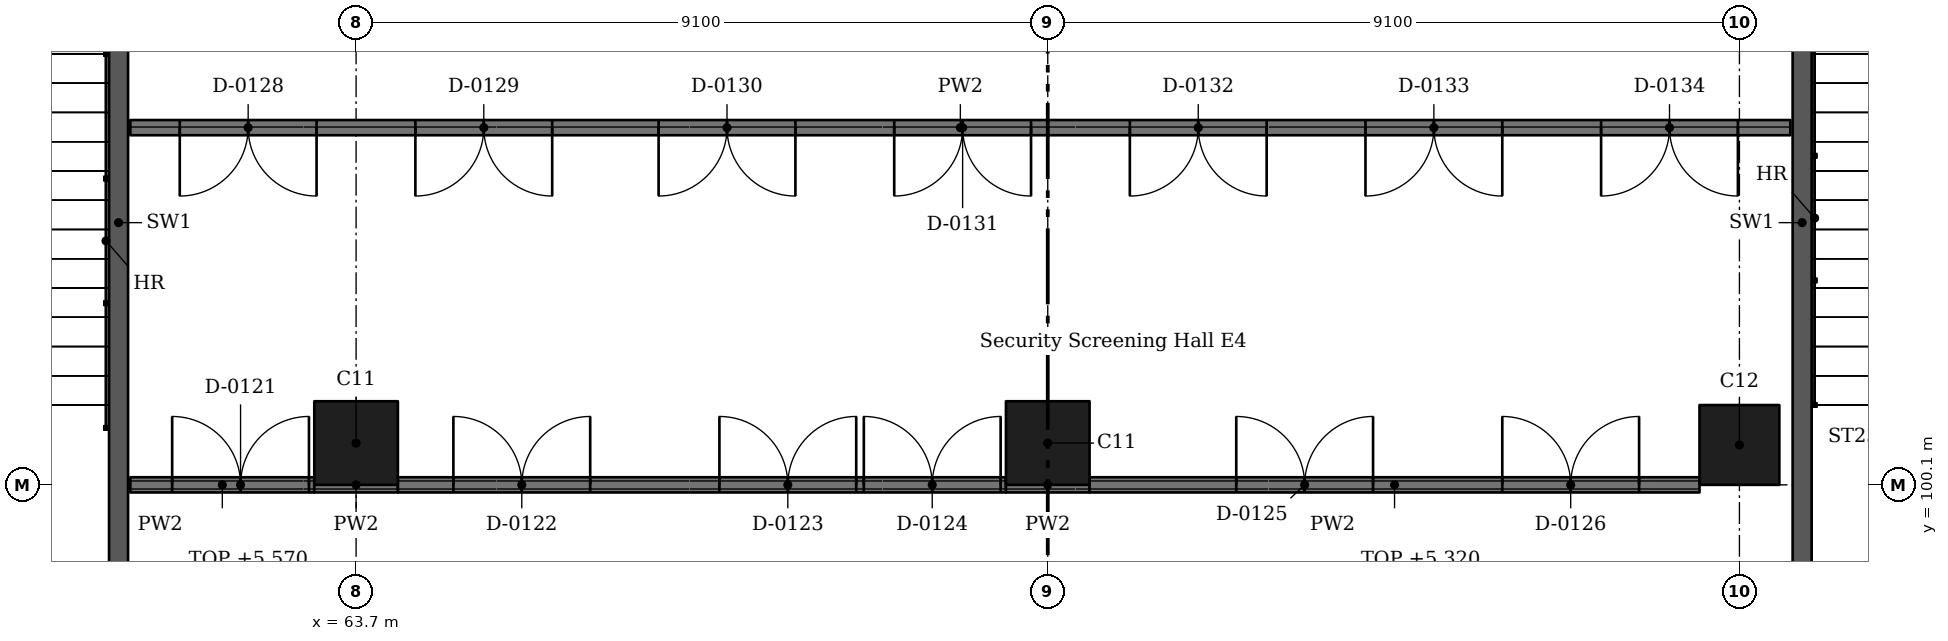
"""IFC4 building model, lengths in metres.
Left out: names, types, materials, properties, quantities, classifications, styles, units other than length and angle.
Written with IfcOpenShell. Run it as: python <this file> out.ifc"""

import sys

from ifc_helpers import new_model, si_unit, direction, frame, frame_2d, origin, origin_2d, place, context, subcontext, project, spatial, rectangle, extrude, element, fill, save


model = new_model("IFC4")
c1 = context("Model", 3, precision=1e-05, world=origin(), true_north=direction((0.0, 1.0)))
c2 = subcontext(c1, "Body", "Model", "MODEL_VIEW")
j1 = project(units=[si_unit("LENGTHUNIT", "METRE"), si_unit("PLANEANGLEUNIT", "RADIAN")], contexts=[c1])
p1 = place(None, origin())
s1 = spatial("IfcSite", under=j1, at=p1, CompositionType="ELEMENT")
p2 = place(p1, origin())
s2 = spatial("IfcBuilding", under=s1, at=p2, CompositionType="ELEMENT")
p3 = place(p2, origin())
s3 = spatial("IfcBuildingStorey", under=s2, at=p3, CompositionType="ELEMENT", Elevation=0.0)
for number, where, z_axis, x_axis in (
    (1, (63.7, 100.65, -0.4), (0.0, 0.0, 1.0), (1.0, 0.0, 0.0)),
    (2, (72.8, 100.65, -0.4), (0.0, 0.0, 1.0), (1.0, 0.0, 0.0)),
):
    element("IfcColumn", number, at=place(p3, frame(where, z_axis=z_axis, x_axis=x_axis)), inside=s3, PredefinedType="COLUMN", context=c2, shape_type="SweptSolid", body=[
        extrude(rectangle(XDim=1.1, YDim=1.1, at=origin_2d()), origin(), (0.0, 0.0, 1.0), 6.77),
    ])
p4 = place(p3, frame((81.9, 100.625, -0.4), z_axis=(0.0, 0.0, 1.0), x_axis=(1.0, 0.0, 0.0)))
e3 = element("IfcColumn", 3, at=p4, inside=s3, PredefinedType="COLUMN", context=c2, shape_type="SweptSolid", body=[
    extrude(rectangle(XDim=1.05, YDim=1.05, at=origin_2d()), origin(), (0.0, 0.0, 1.0), 6.77),
])
for number, where, z_axis, x_axis in (
    (4, (60.575, 108.35, -0.4), (0.0, 0.0, 1.0), (0.0, -1.0, 0.0)),
    (5, (82.725, 108.35, -0.4), (0.0, 0.0, 1.0), (0.0, -1.0, 0.0)),
):
    element("IfcWall", number, at=place(p3, frame(where, z_axis=z_axis, x_axis=x_axis)), inside=s3, PredefinedType="SHEAR", context=c2, shape_type="SweptSolid", body=[
        extrude(rectangle(XDim=9.6, YDim=0.25, at=frame_2d((4.8, 0.0))), origin(), (0.0, 0.0, 1.0), 6.77),
    ])
p5 = place(p3, frame((60.73, 100.1, 0.0), z_axis=(0.0, 0.0, 1.0), x_axis=(1.0, 0.0, 0.0)))
e6 = element("IfcWall", 6, at=p5, inside=s3, PredefinedType="PARTITIONING", context=c2, shape_type="SweptSolid", body=[
    extrude(rectangle(XDim=2.42, YDim=0.2, at=frame_2d((1.21, 0.0))), origin(), (0.0, 0.0, 1.0), 5.57),
])
p6 = place(p5, frame((0.55, 0.0, 0.0)))
e7 = element("IfcOpeningElement", 7, at=p6, cuts=e6, PredefinedType="OPENING", context=c2, shape_type="SweptSolid", body=[
    extrude(rectangle(XDim=1.8, YDim=2.4, at=frame_2d((0.9, 1.2))), frame((0.0, 0.11, 0.0), z_axis=(0.0, -1.0, 0.0), x_axis=(1.0, 0.0, 0.0)), (0.0, 0.0, 1.0), 0.22),
])
p7 = place(p3, frame((60.73, 104.8, 0.0), z_axis=(0.0, 0.0, 1.0), x_axis=(1.0, 0.0, 0.0)))
e8 = element("IfcWall", 8, at=p7, inside=s3, PredefinedType="PARTITIONING", context=c2, shape_type="SweptSolid", body=[
    extrude(rectangle(XDim=21.84, YDim=0.2, at=frame_2d((10.92, 0.0))), origin(), (0.0, 0.0, 1.0), 6.02),
])
p8 = place(p7, frame((0.65, 0.0, 0.0)))
e9 = element("IfcOpeningElement", 9, at=p8, cuts=e8, PredefinedType="OPENING", context=c2, shape_type="SweptSolid", body=[
    extrude(rectangle(XDim=1.8, YDim=2.4, at=frame_2d((0.9, 1.2))), frame((0.0, 0.11, 0.0), z_axis=(0.0, -1.0, 0.0), x_axis=(1.0, 0.0, 0.0)), (0.0, 0.0, 1.0), 0.22),
])
p9 = place(p7, frame((3.75, 0.0, 0.0)))
e10 = element("IfcOpeningElement", 10, at=p9, cuts=e8, PredefinedType="OPENING", context=c2, shape_type="SweptSolid", body=[
    extrude(rectangle(XDim=1.8, YDim=2.4, at=frame_2d((0.9, 1.2))), frame((0.0, 0.11, 0.0), z_axis=(0.0, -1.0, 0.0), x_axis=(1.0, 0.0, 0.0)), (0.0, 0.0, 1.0), 0.22),
])
p10 = place(p7, frame((6.95, 0.0, 0.0)))
e11 = element("IfcOpeningElement", 11, at=p10, cuts=e8, PredefinedType="OPENING", context=c2, shape_type="SweptSolid", body=[
    extrude(rectangle(XDim=1.8, YDim=2.4, at=frame_2d((0.9, 1.2))), frame((0.0, 0.11, 0.0), z_axis=(0.0, -1.0, 0.0), x_axis=(1.0, 0.0, 0.0)), (0.0, 0.0, 1.0), 0.22),
])
p11 = place(p7, frame((10.05, 0.0, 0.0)))
e12 = element("IfcOpeningElement", 12, at=p11, cuts=e8, PredefinedType="OPENING", context=c2, shape_type="SweptSolid", body=[
    extrude(rectangle(XDim=1.8, YDim=2.4, at=frame_2d((0.9, 1.2))), frame((0.0, 0.11, 0.0), z_axis=(0.0, -1.0, 0.0), x_axis=(1.0, 0.0, 0.0)), (0.0, 0.0, 1.0), 0.22),
])
p12 = place(p7, frame((13.15, 0.0, 0.0)))
e13 = element("IfcOpeningElement", 13, at=p12, cuts=e8, PredefinedType="OPENING", context=c2, shape_type="SweptSolid", body=[
    extrude(rectangle(XDim=1.8, YDim=2.4, at=frame_2d((0.9, 1.2))), frame((0.0, 0.11, 0.0), z_axis=(0.0, -1.0, 0.0), x_axis=(1.0, 0.0, 0.0)), (0.0, 0.0, 1.0), 0.22),
])
p13 = place(p7, frame((16.25, 0.0, 0.0)))
e14 = element("IfcOpeningElement", 14, at=p13, cuts=e8, PredefinedType="OPENING", context=c2, shape_type="SweptSolid", body=[
    extrude(rectangle(XDim=1.8, YDim=2.4, at=frame_2d((0.9, 1.2))), frame((0.0, 0.11, 0.0), z_axis=(0.0, -1.0, 0.0), x_axis=(1.0, 0.0, 0.0)), (0.0, 0.0, 1.0), 0.22),
])
p14 = place(p7, frame((19.35, 0.0, 0.0)))
e15 = element("IfcOpeningElement", 15, at=p14, cuts=e8, PredefinedType="OPENING", context=c2, shape_type="SweptSolid", body=[
    extrude(rectangle(XDim=1.8, YDim=2.4, at=frame_2d((0.9, 1.2))), frame((0.0, 0.11, 0.0), z_axis=(0.0, -1.0, 0.0), x_axis=(1.0, 0.0, 0.0)), (0.0, 0.0, 1.0), 0.22),
])
p15 = place(p3, frame((63.15, 100.1, 0.0), z_axis=(0.0, 0.0, 1.0), x_axis=(1.0, 0.0, 0.0)))
e16 = element("IfcWall", 16, at=p15, inside=s3, PredefinedType="PARTITIONING", context=c2, shape_type="SweptSolid", body=[
    extrude(rectangle(XDim=1.1, YDim=0.2, at=frame_2d((0.55, 0.0))), origin(), (0.0, 0.0, 1.0), 6.02),
])
p16 = place(p3, frame((64.25, 100.1, 0.0), z_axis=(0.0, 0.0, 1.0), x_axis=(1.0, 0.0, 0.0)))
e17 = element("IfcWall", 17, at=p16, inside=s3, PredefinedType="PARTITIONING", context=c2, shape_type="SweptSolid", body=[
    extrude(rectangle(XDim=8.0, YDim=0.2, at=frame_2d((4.0, 0.0))), origin(), (0.0, 0.0, 1.0), 5.32),
])
p17 = place(p16, frame((0.73, 0.0, 0.0)))
e18 = element("IfcOpeningElement", 18, at=p17, cuts=e17, PredefinedType="OPENING", context=c2, shape_type="SweptSolid", body=[
    extrude(rectangle(XDim=1.8, YDim=2.4, at=frame_2d((0.9, 1.2))), frame((0.0, 0.11, 0.0), z_axis=(0.0, -1.0, 0.0), x_axis=(1.0, 0.0, 0.0)), (0.0, 0.0, 1.0), 0.22),
])
p18 = place(p16, frame((4.23, 0.0, 0.0)))
e19 = element("IfcOpeningElement", 19, at=p18, cuts=e17, PredefinedType="OPENING", context=c2, shape_type="SweptSolid", body=[
    extrude(rectangle(XDim=1.8, YDim=2.4, at=frame_2d((0.9, 1.2))), frame((0.0, 0.11, 0.0), z_axis=(0.0, -1.0, 0.0), x_axis=(1.0, 0.0, 0.0)), (0.0, 0.0, 1.0), 0.22),
])
p19 = place(p16, frame((6.13, 0.0, 0.0)))
e20 = element("IfcOpeningElement", 20, at=p19, cuts=e17, PredefinedType="OPENING", context=c2, shape_type="SweptSolid", body=[
    extrude(rectangle(XDim=1.8, YDim=2.4, at=frame_2d((0.9, 1.2))), frame((0.0, 0.11, 0.0), z_axis=(0.0, -1.0, 0.0), x_axis=(1.0, 0.0, 0.0)), (0.0, 0.0, 1.0), 0.22),
])
p20 = place(p3, frame((72.25, 100.1, 0.0), z_axis=(0.0, 0.0, 1.0), x_axis=(1.0, 0.0, 0.0)))
e21 = element("IfcWall", 21, at=p20, inside=s3, PredefinedType="PARTITIONING", context=c2, shape_type="SweptSolid", body=[
    extrude(rectangle(XDim=1.1, YDim=0.2, at=frame_2d((0.55, 0.0))), origin(), (0.0, 0.0, 1.0), 6.02),
])
p21 = place(p3, frame((73.35, 100.1, 0.0), z_axis=(0.0, 0.0, 1.0), x_axis=(1.0, 0.0, 0.0)))
e22 = element("IfcWall", 22, at=p21, inside=s3, PredefinedType="PARTITIONING", context=c2, shape_type="SweptSolid", body=[
    extrude(rectangle(XDim=8.025, YDim=0.2, at=frame_2d((4.012, 0.0))), origin(), (0.0, 0.0, 1.0), 5.32),
])
p22 = place(p21, frame((1.93, 0.0, 0.0)))
e23 = element("IfcOpeningElement", 23, at=p22, cuts=e22, PredefinedType="OPENING", context=c2, shape_type="SweptSolid", body=[
    extrude(rectangle(XDim=1.8, YDim=2.4, at=frame_2d((0.9, 1.2))), frame((0.0, 0.11, 0.0), z_axis=(0.0, -1.0, 0.0), x_axis=(1.0, 0.0, 0.0)), (0.0, 0.0, 1.0), 0.22),
])
p23 = place(p21, frame((5.43, 0.0, 0.0)))
e24 = element("IfcOpeningElement", 24, at=p23, cuts=e22, PredefinedType="OPENING", context=c2, shape_type="SweptSolid", body=[
    extrude(rectangle(XDim=1.8, YDim=2.4, at=frame_2d((0.9, 1.2))), frame((0.0, 0.11, 0.0), z_axis=(0.0, -1.0, 0.0), x_axis=(1.0, 0.0, 0.0)), (0.0, 0.0, 1.0), 0.22),
])
p24 = place(p6, origin())
e25 = element("IfcDoor", 25, at=p24, inside=s3, OperationType="DOUBLE_DOOR_SINGLE_SWING", PredefinedType="DOOR", context=c2, shape_type="SweptSolid", body=[
    extrude(rectangle(XDim=1.8, YDim=2.4, at=frame_2d((0.9, 1.2))), frame((0.0, 0.025, 0.0), z_axis=(0.0, -1.0, 0.0), x_axis=(1.0, 0.0, 0.0)), (0.0, 0.0, 1.0), 0.05),
])
fill(e7, e25)
p25 = place(p17, origin())
e26 = element("IfcDoor", 26, at=p25, inside=s3, OperationType="DOUBLE_DOOR_SINGLE_SWING", PredefinedType="DOOR", context=c2, shape_type="SweptSolid", body=[
    extrude(rectangle(XDim=1.8, YDim=2.4, at=frame_2d((0.9, 1.2))), frame((0.0, 0.025, 0.0), z_axis=(0.0, -1.0, 0.0), x_axis=(1.0, 0.0, 0.0)), (0.0, 0.0, 1.0), 0.05),
])
fill(e18, e26)
p26 = place(p18, origin())
e27 = element("IfcDoor", 27, at=p26, inside=s3, OperationType="DOUBLE_DOOR_SINGLE_SWING", PredefinedType="DOOR", context=c2, shape_type="SweptSolid", body=[
    extrude(rectangle(XDim=1.8, YDim=2.4, at=frame_2d((0.9, 1.2))), frame((0.0, 0.025, 0.0), z_axis=(0.0, -1.0, 0.0), x_axis=(1.0, 0.0, 0.0)), (0.0, 0.0, 1.0), 0.05),
])
fill(e19, e27)
p27 = place(p19, origin())
e28 = element("IfcDoor", 28, at=p27, inside=s3, OperationType="DOUBLE_DOOR_SINGLE_SWING", PredefinedType="DOOR", context=c2, shape_type="SweptSolid", body=[
    extrude(rectangle(XDim=1.8, YDim=2.4, at=frame_2d((0.9, 1.2))), frame((0.0, 0.025, 0.0), z_axis=(0.0, -1.0, 0.0), x_axis=(1.0, 0.0, 0.0)), (0.0, 0.0, 1.0), 0.05),
])
fill(e20, e28)
p28 = place(p22, origin())
e29 = element("IfcDoor", 29, at=p28, inside=s3, OperationType="DOUBLE_DOOR_SINGLE_SWING", PredefinedType="DOOR", context=c2, shape_type="SweptSolid", body=[
    extrude(rectangle(XDim=1.8, YDim=2.4, at=frame_2d((0.9, 1.2))), frame((0.0, 0.025, 0.0), z_axis=(0.0, -1.0, 0.0), x_axis=(1.0, 0.0, 0.0)), (0.0, 0.0, 1.0), 0.05),
])
fill(e23, e29)
p29 = place(p23, origin())
e30 = element("IfcDoor", 30, at=p29, inside=s3, OperationType="DOUBLE_DOOR_SINGLE_SWING", PredefinedType="DOOR", context=c2, shape_type="SweptSolid", body=[
    extrude(rectangle(XDim=1.8, YDim=2.4, at=frame_2d((0.9, 1.2))), frame((0.0, 0.025, 0.0), z_axis=(0.0, -1.0, 0.0), x_axis=(1.0, 0.0, 0.0)), (0.0, 0.0, 1.0), 0.05),
])
fill(e24, e30)
p30 = place(p8, origin())
e31 = element("IfcDoor", 31, at=p30, inside=s3, OperationType="DOUBLE_DOOR_SINGLE_SWING", PredefinedType="DOOR", context=c2, shape_type="SweptSolid", body=[
    extrude(rectangle(XDim=1.8, YDim=2.4, at=frame_2d((0.9, 1.2))), frame((0.0, 0.025, 0.0), z_axis=(0.0, -1.0, 0.0), x_axis=(1.0, 0.0, 0.0)), (0.0, 0.0, 1.0), 0.05),
])
fill(e9, e31)
p31 = place(p9, origin())
e32 = element("IfcDoor", 32, at=p31, inside=s3, OperationType="DOUBLE_DOOR_SINGLE_SWING", PredefinedType="DOOR", context=c2, shape_type="SweptSolid", body=[
    extrude(rectangle(XDim=1.8, YDim=2.4, at=frame_2d((0.9, 1.2))), frame((0.0, 0.025, 0.0), z_axis=(0.0, -1.0, 0.0), x_axis=(1.0, 0.0, 0.0)), (0.0, 0.0, 1.0), 0.05),
])
fill(e10, e32)
p32 = place(p10, origin())
e33 = element("IfcDoor", 33, at=p32, inside=s3, OperationType="DOUBLE_DOOR_SINGLE_SWING", PredefinedType="DOOR", context=c2, shape_type="SweptSolid", body=[
    extrude(rectangle(XDim=1.8, YDim=2.4, at=frame_2d((0.9, 1.2))), frame((0.0, 0.025, 0.0), z_axis=(0.0, -1.0, 0.0), x_axis=(1.0, 0.0, 0.0)), (0.0, 0.0, 1.0), 0.05),
])
fill(e11, e33)
p33 = place(p11, origin())
e34 = element("IfcDoor", 34, at=p33, inside=s3, OperationType="DOUBLE_DOOR_SINGLE_SWING", PredefinedType="DOOR", context=c2, shape_type="SweptSolid", body=[
    extrude(rectangle(XDim=1.8, YDim=2.4, at=frame_2d((0.9, 1.2))), frame((0.0, 0.025, 0.0), z_axis=(0.0, -1.0, 0.0), x_axis=(1.0, 0.0, 0.0)), (0.0, 0.0, 1.0), 0.05),
])
fill(e12, e34)
p34 = place(p12, origin())
e35 = element("IfcDoor", 35, at=p34, inside=s3, OperationType="DOUBLE_DOOR_SINGLE_SWING", PredefinedType="DOOR", context=c2, shape_type="SweptSolid", body=[
    extrude(rectangle(XDim=1.8, YDim=2.4, at=frame_2d((0.9, 1.2))), frame((0.0, 0.025, 0.0), z_axis=(0.0, -1.0, 0.0), x_axis=(1.0, 0.0, 0.0)), (0.0, 0.0, 1.0), 0.05),
])
fill(e13, e35)
p35 = place(p13, origin())
e36 = element("IfcDoor", 36, at=p35, inside=s3, OperationType="DOUBLE_DOOR_SINGLE_SWING", PredefinedType="DOOR", context=c2, shape_type="SweptSolid", body=[
    extrude(rectangle(XDim=1.8, YDim=2.4, at=frame_2d((0.9, 1.2))), frame((0.0, 0.025, 0.0), z_axis=(0.0, -1.0, 0.0), x_axis=(1.0, 0.0, 0.0)), (0.0, 0.0, 1.0), 0.05),
])
fill(e14, e36)
p36 = place(p14, origin())
e37 = element("IfcDoor", 37, at=p36, inside=s3, OperationType="DOUBLE_DOOR_SINGLE_SWING", PredefinedType="DOOR", context=c2, shape_type="SweptSolid", body=[
    extrude(rectangle(XDim=1.8, YDim=2.4, at=frame_2d((0.9, 1.2))), frame((0.0, 0.025, 0.0), z_axis=(0.0, -1.0, 0.0), x_axis=(1.0, 0.0, 0.0)), (0.0, 0.0, 1.0), 0.05),
])
fill(e15, e37)
save(model, sys.argv[1])
